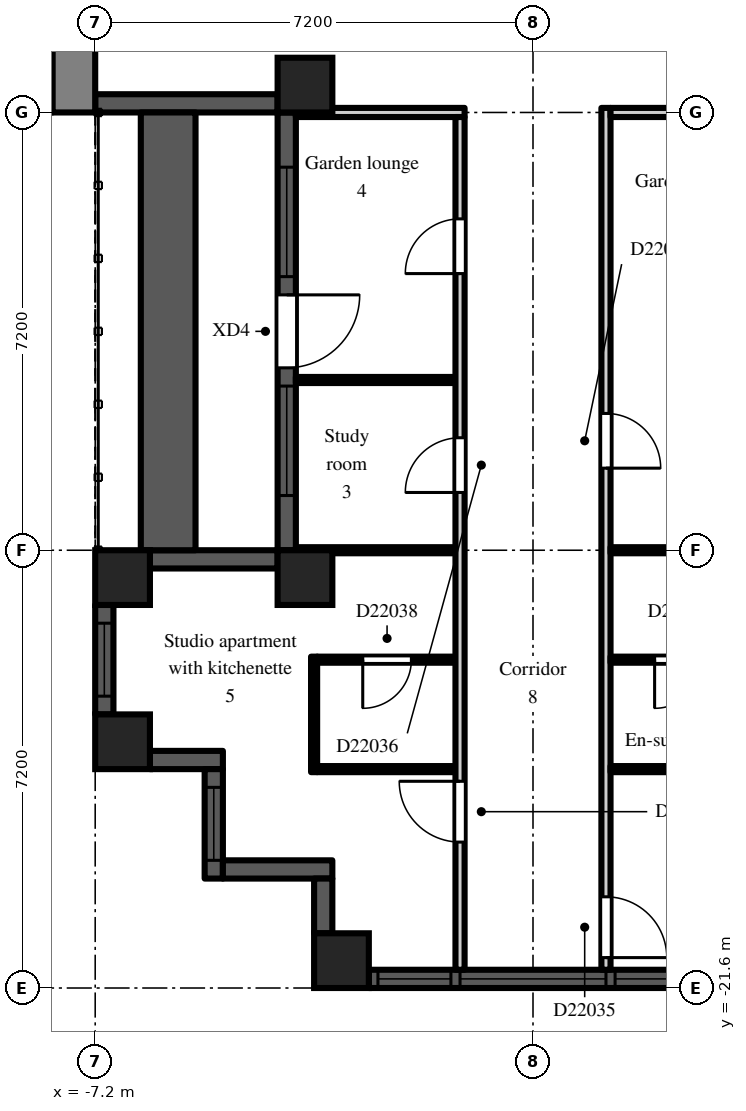
"""IFC4 building model, lengths in metres.
Left out: names, types, materials, properties, quantities, classifications, styles, units other than length and angle.
Written with IfcOpenShell. Run it as: python <this file> out.ifc"""

import sys

from ifc_helpers import new_model, si_unit, direction, frame, frame_2d, origin, origin_2d, place, context, subcontext, project, spatial, rectangle, extrude, element, fill, save


model = new_model("IFC4")
c1 = context("Model", 3, precision=1e-05, world=origin(), true_north=direction((0.0, 1.0)))
c2 = subcontext(c1, "Body", "Model", "MODEL_VIEW")
j1 = project(units=[si_unit("LENGTHUNIT", "METRE"), si_unit("PLANEANGLEUNIT", "RADIAN")], contexts=[c1])
p1 = place(None, origin())
s1 = spatial("IfcSite", under=j1, at=p1, CompositionType="ELEMENT")
p2 = place(p1, origin())
s2 = spatial("IfcBuilding", under=s1, at=p2, CompositionType="ELEMENT")
p3 = place(p2, frame((0.0, 0.0, 159.3)))
s3 = spatial("IfcBuildingStorey", under=s2, at=p3, CompositionType="ELEMENT", Elevation=159.3)
for number, where, z_axis, x_axis in (
    (1, (-6.75, -17.55, 0.0), (0.0, 0.0, 1.0), (1.0, 0.0, 0.0)),
    (2, (-6.75, -14.85, 0.0), (0.0, 0.0, 1.0), (1.0, 0.0, 0.0)),
    (3, (-3.75, -14.85, 0.0), (0.0, 0.0, 1.0), (1.0, 0.0, 0.0)),
    (4, (-3.75, -6.75, 0.0), (0.0, 0.0, 1.0), (1.0, 0.0, 0.0)),
    (5, (-3.15, -21.15, 0.0), (0.0, 0.0, 1.0), (1.0, 0.0, 0.0)),
):
    element("IfcColumn", number, at=place(p3, frame(where, z_axis=z_axis, x_axis=x_axis)), inside=s3, PredefinedType="COLUMN", context=c2, shape_type="SweptSolid", body=[
        extrude(rectangle(XDim=0.9, YDim=0.9, at=origin_2d()), origin(), (0.0, 0.0, 1.0), 3.0),
    ])
p4 = place(p3, frame((-7.2, -7.05, 0.0), z_axis=(0.0, 0.0, 1.0), x_axis=(1.0, 0.0, 0.0)))
e6 = element("IfcWall", 6, at=p4, inside=s3, PredefinedType="SOLIDWALL", context=c2, shape_type="SweptSolid", body=[
    extrude(rectangle(XDim=3.0, YDim=0.3, at=frame_2d((1.5, 0.0))), origin(), (0.0, 0.0, 1.0), 2.55),
])
p5 = place(p3, frame((-4.05, -7.2, 0.0), z_axis=(0.0, 0.0, 1.0), x_axis=(0.0, -1.0, 0.0)))
e7 = element("IfcWall", 7, at=p5, inside=s3, PredefinedType="SOLIDWALL", context=c2, shape_type="SweptSolid", body=[
    extrude(rectangle(XDim=7.2, YDim=0.3, at=frame_2d((3.6, 0.0))), origin(), (0.0, 0.0, 1.0), 2.55),
])
p6 = place(p5, frame((3.0, 0.0, 0.0)))
e8 = element("IfcOpeningElement", 8, at=p6, cuts=e7, PredefinedType="OPENING", context=c2, shape_type="SweptSolid", body=[
    extrude(rectangle(XDim=1.2, YDim=2.05, at=frame_2d((0.6, 1.025))), frame((0.0, 0.16, 0.0), z_axis=(0.0, -1.0, 0.0), x_axis=(1.0, 0.0, 0.0)), (0.0, 0.0, 1.0), 0.32),
])
p7 = place(p5, frame((0.9, 0.0, 0.2)))
e9 = element("IfcOpeningElement", 9, at=p7, cuts=e7, PredefinedType="OPENING", context=c2, shape_type="SweptSolid", body=[
    extrude(rectangle(XDim=1.8, YDim=1.85, at=frame_2d((0.9, 0.925))), frame((0.0, 0.16, 0.0), z_axis=(0.0, -1.0, 0.0), x_axis=(1.0, 0.0, 0.0)), (0.0, 0.0, 1.0), 0.32),
])
p8 = place(p5, frame((4.5, 0.0, 0.2)))
e10 = element("IfcOpeningElement", 10, at=p8, cuts=e7, PredefinedType="OPENING", context=c2, shape_type="SweptSolid", body=[
    extrude(rectangle(XDim=1.8, YDim=1.85, at=frame_2d((0.9, 0.925))), frame((0.0, 0.16, 0.0), z_axis=(0.0, -1.0, 0.0), x_axis=(1.0, 0.0, 0.0)), (0.0, 0.0, 1.0), 0.32),
])
p9 = place(p3, frame((-4.2, -14.55, 0.0), z_axis=(0.0, 0.0, 1.0), x_axis=(-1.0, 0.0, 0.0)))
e11 = element("IfcWall", 11, at=p9, inside=s3, PredefinedType="SOLIDWALL", context=c2, shape_type="SweptSolid", body=[
    extrude(rectangle(XDim=2.1, YDim=0.3, at=frame_2d((1.05, 0.0))), origin(), (0.0, 0.0, 1.0), 2.55),
])
p10 = place(p3, frame((-7.05, -15.3, 0.0), z_axis=(0.0, 0.0, 1.0), x_axis=(0.0, -1.0, 0.0)))
e12 = element("IfcWall", 12, at=p10, inside=s3, PredefinedType="SOLIDWALL", context=c2, shape_type="SweptSolid", body=[
    extrude(rectangle(XDim=1.8, YDim=0.3, at=frame_2d((0.9, 0.0))), origin(), (0.0, 0.0, 1.0), 2.2),
])
p11 = place(p10, frame((0.3, 0.0, 0.2)))
e13 = element("IfcOpeningElement", 13, at=p11, cuts=e12, PredefinedType="OPENING", context=c2, shape_type="SweptSolid", body=[
    extrude(rectangle(XDim=1.2, YDim=1.85, at=frame_2d((0.6, 0.925))), frame((0.0, 0.16, 0.0), z_axis=(0.0, -1.0, 0.0), x_axis=(1.0, 0.0, 0.0)), (0.0, 0.0, 1.0), 0.32),
])
p12 = place(p3, frame((-6.3, -17.85, 0.0), z_axis=(0.0, 0.0, 1.0), x_axis=(1.0, 0.0, 0.0)))
e14 = element("IfcWall", 14, at=p12, inside=s3, PredefinedType="SOLIDWALL", context=c2, shape_type="SweptSolid", body=[
    extrude(rectangle(XDim=1.2, YDim=0.3, at=frame_2d((0.6, 0.0))), origin(), (0.0, 0.0, 1.0), 2.55),
])
p13 = place(p3, frame((-5.25, -18.0, 0.0), z_axis=(0.0, 0.0, 1.0), x_axis=(0.0, -1.0, 0.0)))
e15 = element("IfcWall", 15, at=p13, inside=s3, PredefinedType="SOLIDWALL", context=c2, shape_type="SweptSolid", body=[
    extrude(rectangle(XDim=1.8, YDim=0.3, at=frame_2d((0.9, 0.0))), origin(), (0.0, 0.0, 1.0), 2.55),
])
p14 = place(p13, frame((0.3, 0.0, 0.2)))
e16 = element("IfcOpeningElement", 16, at=p14, cuts=e15, PredefinedType="OPENING", context=c2, shape_type="SweptSolid", body=[
    extrude(rectangle(XDim=1.2, YDim=1.85, at=frame_2d((0.6, 0.925))), frame((0.0, 0.16, 0.0), z_axis=(0.0, -1.0, 0.0), x_axis=(1.0, 0.0, 0.0)), (0.0, 0.0, 1.0), 0.32),
])
p15 = place(p3, frame((-5.1, -19.65, 0.0), z_axis=(0.0, 0.0, 1.0), x_axis=(1.0, 0.0, 0.0)))
e17 = element("IfcWall", 17, at=p15, inside=s3, PredefinedType="SOLIDWALL", context=c2, shape_type="SweptSolid", body=[
    extrude(rectangle(XDim=1.8, YDim=0.3, at=frame_2d((0.9, 0.0))), origin(), (0.0, 0.0, 1.0), 2.55),
])
p16 = place(p3, frame((-3.45, -19.8, 0.0), z_axis=(0.0, 0.0, 1.0), x_axis=(0.0, -1.0, 0.0)))
e18 = element("IfcWall", 18, at=p16, inside=s3, PredefinedType="SOLIDWALL", context=c2, shape_type="SweptSolid", body=[
    extrude(rectangle(XDim=0.9, YDim=0.3, at=frame_2d((0.45, 0.0))), origin(), (0.0, 0.0, 1.0), 2.55),
])
p17 = place(p3, frame((-2.7, -21.45, 0.0), z_axis=(0.0, 0.0, 1.0), x_axis=(1.0, 0.0, 0.0)))
e19 = element("IfcWall", 19, at=p17, inside=s3, PredefinedType="SOLIDWALL", context=c2, shape_type="SweptSolid", body=[
    extrude(rectangle(XDim=5.4, YDim=0.3, at=frame_2d((2.7, 0.0))), origin(), (0.0, 0.0, 1.0), 2.2),
])
p18 = place(p17, frame((1.5, 0.0, 0.2)))
e20 = element("IfcOpeningElement", 20, at=p18, cuts=e19, PredefinedType="OPENING", context=c2, shape_type="SweptSolid", body=[
    extrude(rectangle(XDim=2.4, YDim=1.85, at=frame_2d((1.2, 0.925))), frame((0.0, 0.16, 0.0), z_axis=(0.0, -1.0, 0.0), x_axis=(1.0, 0.0, 0.0)), (0.0, 0.0, 1.0), 0.32),
])
p19 = place(p17, frame((0.15, 0.0, 0.2)))
e21 = element("IfcOpeningElement", 21, at=p19, cuts=e19, PredefinedType="OPENING", context=c2, shape_type="SweptSolid", body=[
    extrude(rectangle(XDim=1.2, YDim=1.85, at=frame_2d((0.6, 0.925))), frame((0.0, 0.16, 0.0), z_axis=(0.0, -1.0, 0.0), x_axis=(1.0, 0.0, 0.0)), (0.0, 0.0, 1.0), 0.32),
])
p20 = place(p17, frame((4.05, 0.0, 0.2)))
e22 = element("IfcOpeningElement", 22, at=p20, cuts=e19, PredefinedType="OPENING", context=c2, shape_type="SweptSolid", body=[
    extrude(rectangle(XDim=1.2, YDim=1.85, at=frame_2d((0.6, 0.925))), frame((0.0, 0.16, 0.0), z_axis=(0.0, -1.0, 0.0), x_axis=(1.0, 0.0, 0.0)), (0.0, 0.0, 1.0), 0.32),
])
p21 = place(p3, frame((-6.0, -14.4, 0.0), z_axis=(0.0, 0.0, 1.0), x_axis=(0.0, 1.0, 0.0)))
e23 = element("IfcWall", 23, at=p21, inside=s3, PredefinedType="PARAPET", context=c2, shape_type="SweptSolid", body=[
    extrude(rectangle(XDim=7.2, YDim=0.9, at=frame_2d((3.6, 0.0))), origin(), (0.0, 0.0, 1.0), 0.8),
])
p22 = place(p3, frame((-7.55, -7.2, 0.0), z_axis=(0.0, 0.0, 1.0), x_axis=(0.0, 1.0, 0.0)))
e24 = element("IfcWall", 24, at=p22, inside=s3, PredefinedType="SHEAR", context=c2, shape_type="SweptSolid", body=[
    extrude(rectangle(XDim=14.4, YDim=0.7, at=frame_2d((7.2, 0.0))), origin(), (0.0, 0.0, 1.0), 2.55),
])
p23 = place(p22, frame((6.0, 0.0, 0.0)))
e25 = element("IfcOpeningElement", 25, at=p23, cuts=e24, PredefinedType="OPENING", context=c2, shape_type="SweptSolid", body=[
    extrude(rectangle(XDim=2.4, YDim=2.2, at=frame_2d((1.2, 1.1))), frame((0.0, 0.36, 0.0), z_axis=(0.0, -1.0, 0.0), x_axis=(1.0, 0.0, 0.0)), (0.0, 0.0, 1.0), 0.72),
])
for number, where, z_axis, x_axis in (
    (26, (-3.9, -14.4, 0.0), (0.0, 0.0, 1.0), (1.0, 0.0, 0.0)),
    (27, (-3.9, -11.6, 0.0), (0.0, 0.0, 1.0), (1.0, 0.0, 0.0)),
):
    element("IfcWall", number, at=place(p3, frame(where, z_axis=z_axis, x_axis=x_axis)), inside=s3, PredefinedType="PARTITIONING", context=c2, shape_type="SweptSolid", body=[
        extrude(rectangle(XDim=2.625, YDim=0.1, at=frame_2d((1.312, 0.0))), origin(), (0.0, 0.0, 1.0), 2.55),
    ])
p24 = place(p3, frame((-3.9, -7.2, 0.0), z_axis=(0.0, 0.0, 1.0), x_axis=(1.0, 0.0, 0.0)))
e28 = element("IfcWall", 28, at=p24, inside=s3, PredefinedType="PARTITIONING", context=c2, shape_type="SweptSolid", body=[
    extrude(rectangle(XDim=2.775, YDim=0.15, at=frame_2d((1.387, 0.0))), origin(), (0.0, 0.0, 1.0), 2.55),
])
p25 = place(p3, frame((-3.6, -18.05, 0.0), z_axis=(0.0, 0.0, 1.0), x_axis=(0.0, 1.0, 0.0)))
e29 = element("IfcWall", 29, at=p25, inside=s3, PredefinedType="PARTITIONING", context=c2, shape_type="SweptSolid", body=[
    extrude(rectangle(XDim=1.9, YDim=0.1, at=frame_2d((0.95, 0.0))), origin(), (0.0, 0.0, 1.0), 2.55),
])
p26 = place(p3, frame((-3.55, -18.0, 0.0), z_axis=(0.0, 0.0, 1.0), x_axis=(1.0, 0.0, 0.0)))
e30 = element("IfcWall", 30, at=p26, inside=s3, PredefinedType="PARTITIONING", context=c2, shape_type="SweptSolid", body=[
    extrude(rectangle(XDim=2.275, YDim=0.1, at=frame_2d((1.138, 0.0))), origin(), (0.0, 0.0, 1.0), 2.55),
])
p27 = place(p3, frame((-3.55, -16.2, 0.0), z_axis=(0.0, 0.0, 1.0), x_axis=(1.0, 0.0, 0.0)))
e31 = element("IfcWall", 31, at=p27, inside=s3, PredefinedType="PARTITIONING", context=c2, shape_type="SweptSolid", body=[
    extrude(rectangle(XDim=2.275, YDim=0.1, at=frame_2d((1.138, 0.0))), origin(), (0.0, 0.0, 1.0), 2.55),
])
p28 = place(p27, frame((0.75, 0.0, 0.0)))
e32 = element("IfcOpeningElement", 32, at=p28, cuts=e31, PredefinedType="OPENING", context=c2, shape_type="SweptSolid", body=[
    extrude(rectangle(XDim=0.8, YDim=2.1, at=frame_2d((0.4, 1.05))), frame((0.0, 0.06, 0.0), z_axis=(0.0, -1.0, 0.0), x_axis=(1.0, 0.0, 0.0)), (0.0, 0.0, 1.0), 0.12),
])
p29 = place(p3, frame((-1.2, -21.3, 0.0), z_axis=(0.0, 0.0, 1.0), x_axis=(0.0, 1.0, 0.0)))
e33 = element("IfcWall", 33, at=p29, inside=s3, PredefinedType="PARTITIONING", context=c2, shape_type="SweptSolid", body=[
    extrude(rectangle(XDim=14.025, YDim=0.15, at=frame_2d((7.013, 0.0))), origin(), (0.0, 0.0, 1.0), 2.55),
])
p30 = place(p29, frame((7.85, 0.0, 0.0)))
e34 = element("IfcOpeningElement", 34, at=p30, cuts=e33, PredefinedType="OPENING", context=c2, shape_type="SweptSolid", body=[
    extrude(rectangle(XDim=0.9, YDim=2.1, at=frame_2d((0.45, 1.05))), frame((0.0, 0.085, 0.0), z_axis=(0.0, -1.0, 0.0), x_axis=(1.0, 0.0, 0.0)), (0.0, 0.0, 1.0), 0.17),
])
p31 = place(p29, frame((11.45, 0.0, 0.0)))
e35 = element("IfcOpeningElement", 35, at=p31, cuts=e33, PredefinedType="OPENING", context=c2, shape_type="SweptSolid", body=[
    extrude(rectangle(XDim=0.9, YDim=2.1, at=frame_2d((0.45, 1.05))), frame((0.0, 0.085, 0.0), z_axis=(0.0, -1.0, 0.0), x_axis=(1.0, 0.0, 0.0)), (0.0, 0.0, 1.0), 0.17),
])
p32 = place(p29, frame((2.1, 0.0, 0.0)))
e36 = element("IfcOpeningElement", 36, at=p32, cuts=e33, PredefinedType="OPENING", context=c2, shape_type="SweptSolid", body=[
    extrude(rectangle(XDim=1.0, YDim=2.1, at=frame_2d((0.5, 1.05))), frame((0.0, 0.085, 0.0), z_axis=(0.0, -1.0, 0.0), x_axis=(1.0, 0.0, 0.0)), (0.0, 0.0, 1.0), 0.17),
])
p33 = place(p3, frame((1.2, -21.3, 0.0), z_axis=(0.0, 0.0, 1.0), x_axis=(0.0, 1.0, 0.0)))
e37 = element("IfcWall", 37, at=p33, inside=s3, PredefinedType="PARTITIONING", context=c2, shape_type="SweptSolid", body=[
    extrude(rectangle(XDim=14.175, YDim=0.15, at=frame_2d((7.087, 0.0))), origin(), (0.0, 0.0, 1.0), 2.55),
])
p34 = place(p33, frame((8.25, 0.0, 0.0)))
e38 = element("IfcOpeningElement", 38, at=p34, cuts=e37, PredefinedType="OPENING", context=c2, shape_type="SweptSolid", body=[
    extrude(rectangle(XDim=0.9, YDim=2.1, at=frame_2d((0.45, 1.05))), frame((0.0, 0.085, 0.0), z_axis=(0.0, -1.0, 0.0), x_axis=(1.0, 0.0, 0.0)), (0.0, 0.0, 1.0), 0.17),
])
p35 = place(p33, frame((0.2, 0.0, 0.0)))
e39 = element("IfcOpeningElement", 39, at=p35, cuts=e37, PredefinedType="OPENING", context=c2, shape_type="SweptSolid", body=[
    extrude(rectangle(XDim=1.0, YDim=2.1, at=frame_2d((0.5, 1.05))), frame((0.0, 0.085, 0.0), z_axis=(0.0, -1.0, 0.0), x_axis=(1.0, 0.0, 0.0)), (0.0, 0.0, 1.0), 0.17),
])
p36 = place(p3, frame((1.275, -18.0, 0.0), z_axis=(0.0, 0.0, 1.0), x_axis=(1.0, 0.0, 0.0)))
e40 = element("IfcWall", 40, at=p36, inside=s3, PredefinedType="PARTITIONING", context=c2, shape_type="SweptSolid", body=[
    extrude(rectangle(XDim=2.375, YDim=0.1, at=frame_2d((1.188, 0.0))), origin(), (0.0, 0.0, 1.0), 2.55),
])
p37 = place(p3, frame((1.275, -16.2, 0.0), z_axis=(0.0, 0.0, 1.0), x_axis=(1.0, 0.0, 0.0)))
e41 = element("IfcWall", 41, at=p37, inside=s3, PredefinedType="PARTITIONING", context=c2, shape_type="SweptSolid", body=[
    extrude(rectangle(XDim=2.375, YDim=0.1, at=frame_2d((1.188, 0.0))), origin(), (0.0, 0.0, 1.0), 2.55),
])
p38 = place(p37, frame((0.725, 0.0, 0.0)))
e42 = element("IfcOpeningElement", 42, at=p38, cuts=e41, PredefinedType="OPENING", context=c2, shape_type="SweptSolid", body=[
    extrude(rectangle(XDim=0.8, YDim=2.1, at=frame_2d((0.4, 1.05))), frame((0.0, 0.06, 0.0), z_axis=(0.0, -1.0, 0.0), x_axis=(1.0, 0.0, 0.0)), (0.0, 0.0, 1.0), 0.12),
])
p39 = place(p3, frame((1.275, -14.4, 0.0), z_axis=(0.0, 0.0, 1.0), x_axis=(1.0, 0.0, 0.0)))
e43 = element("IfcWall", 43, at=p39, inside=s3, PredefinedType="PARTITIONING", context=c2, shape_type="SweptSolid", body=[
    extrude(rectangle(XDim=2.625, YDim=0.1, at=frame_2d((1.312, 0.0))), origin(), (0.0, 0.0, 1.0), 2.55),
])
p40 = place(p3, frame((1.275, -7.2, 0.0), z_axis=(0.0, 0.0, 1.0), x_axis=(1.0, 0.0, 0.0)))
e44 = element("IfcWall", 44, at=p40, inside=s3, PredefinedType="PARTITIONING", context=c2, shape_type="SweptSolid", body=[
    extrude(rectangle(XDim=2.625, YDim=0.15, at=frame_2d((1.312, 0.0))), origin(), (0.0, 0.0, 1.0), 2.55),
])
p41 = place(p6, origin())
e45 = element("IfcDoor", 45, at=p41, inside=s3, OperationType="SINGLE_SWING_LEFT", PredefinedType="DOOR", context=c2, shape_type="SweptSolid", body=[
    extrude(rectangle(XDim=1.2, YDim=2.05, at=frame_2d((0.6, 1.025))), frame((0.0, 0.025, 0.0), z_axis=(0.0, -1.0, 0.0), x_axis=(1.0, 0.0, 0.0)), (0.0, 0.0, 1.0), 0.05),
])
fill(e8, e45)
p42 = place(p7, origin())
e46 = element("IfcWindow", 46, at=p42, inside=s3, PartitioningType="SINGLE_PANEL", PredefinedType="WINDOW", context=c2, shape_type="SweptSolid", body=[
    extrude(rectangle(XDim=1.8, YDim=1.85, at=frame_2d((0.9, 0.925))), frame((0.0, 0.03, 0.0), z_axis=(0.0, -1.0, 0.0), x_axis=(1.0, 0.0, 0.0)), (0.0, 0.0, 1.0), 0.06),
])
fill(e9, e46)
p43 = place(p8, origin())
e47 = element("IfcWindow", 47, at=p43, inside=s3, PartitioningType="SINGLE_PANEL", PredefinedType="WINDOW", context=c2, shape_type="SweptSolid", body=[
    extrude(rectangle(XDim=1.8, YDim=1.85, at=frame_2d((0.9, 0.925))), frame((0.0, 0.03, 0.0), z_axis=(0.0, -1.0, 0.0), x_axis=(1.0, 0.0, 0.0)), (0.0, 0.0, 1.0), 0.06),
])
fill(e10, e47)
p44 = place(p11, origin())
e48 = element("IfcWindow", 48, at=p44, inside=s3, PartitioningType="SINGLE_PANEL", PredefinedType="WINDOW", context=c2, shape_type="SweptSolid", body=[
    extrude(rectangle(XDim=1.2, YDim=1.85, at=frame_2d((0.6, 0.925))), frame((0.0, 0.03, 0.0), z_axis=(0.0, -1.0, 0.0), x_axis=(1.0, 0.0, 0.0)), (0.0, 0.0, 1.0), 0.06),
])
fill(e13, e48)
p45 = place(p14, origin())
e49 = element("IfcWindow", 49, at=p45, inside=s3, PartitioningType="SINGLE_PANEL", PredefinedType="WINDOW", context=c2, shape_type="SweptSolid", body=[
    extrude(rectangle(XDim=1.2, YDim=1.85, at=frame_2d((0.6, 0.925))), frame((0.0, 0.03, 0.0), z_axis=(0.0, -1.0, 0.0), x_axis=(1.0, 0.0, 0.0)), (0.0, 0.0, 1.0), 0.06),
])
fill(e16, e49)
p46 = place(p18, origin())
e50 = element("IfcWindow", 50, at=p46, inside=s3, PartitioningType="SINGLE_PANEL", PredefinedType="WINDOW", context=c2, shape_type="SweptSolid", body=[
    extrude(rectangle(XDim=2.4, YDim=1.85, at=frame_2d((1.2, 0.925))), frame((0.0, 0.03, 0.0), z_axis=(0.0, -1.0, 0.0), x_axis=(1.0, 0.0, 0.0)), (0.0, 0.0, 1.0), 0.06),
])
fill(e20, e50)
p47 = place(p19, origin())
e51 = element("IfcWindow", 51, at=p47, inside=s3, PartitioningType="SINGLE_PANEL", PredefinedType="WINDOW", context=c2, shape_type="SweptSolid", body=[
    extrude(rectangle(XDim=1.2, YDim=1.85, at=frame_2d((0.6, 0.925))), frame((0.0, 0.03, 0.0), z_axis=(0.0, -1.0, 0.0), x_axis=(1.0, 0.0, 0.0)), (0.0, 0.0, 1.0), 0.06),
])
fill(e21, e51)
p48 = place(p20, origin())
e52 = element("IfcWindow", 52, at=p48, inside=s3, PartitioningType="SINGLE_PANEL", PredefinedType="WINDOW", context=c2, shape_type="SweptSolid", body=[
    extrude(rectangle(XDim=1.2, YDim=1.85, at=frame_2d((0.6, 0.925))), frame((0.0, 0.03, 0.0), z_axis=(0.0, -1.0, 0.0), x_axis=(1.0, 0.0, 0.0)), (0.0, 0.0, 1.0), 0.06),
])
fill(e22, e52)
p49 = place(p34, frame((0.9, 0.0, 0.0), z_axis=(0.0, 0.0, 1.0), x_axis=(-1.0, 0.0, 0.0)))
e53 = element("IfcDoor", 53, at=p49, inside=s3, OperationType="SINGLE_SWING_RIGHT", PredefinedType="DOOR", context=c2, shape_type="SweptSolid", body=[
    extrude(rectangle(XDim=0.9, YDim=2.1, at=frame_2d((0.45, 1.05))), frame((0.0, 0.025, 0.0), z_axis=(0.0, -1.0, 0.0), x_axis=(1.0, 0.0, 0.0)), (0.0, 0.0, 1.0), 0.05),
])
fill(e38, e53)
p50 = place(p38, frame((0.8, 0.0, 0.0), z_axis=(0.0, 0.0, 1.0), x_axis=(-1.0, 0.0, 0.0)))
e54 = element("IfcDoor", 54, at=p50, inside=s3, OperationType="SINGLE_SWING_RIGHT", PredefinedType="DOOR", context=c2, shape_type="SweptSolid", body=[
    extrude(rectangle(XDim=0.8, YDim=2.1, at=frame_2d((0.4, 1.05))), frame((0.0, 0.025, 0.0), z_axis=(0.0, -1.0, 0.0), x_axis=(1.0, 0.0, 0.0)), (0.0, 0.0, 1.0), 0.05),
])
fill(e42, e54)
p51 = place(p35, frame((1.0, 0.0, 0.0), z_axis=(0.0, 0.0, 1.0), x_axis=(-1.0, 0.0, 0.0)))
e55 = element("IfcDoor", 55, at=p51, inside=s3, OperationType="SINGLE_SWING_RIGHT", PredefinedType="DOOR", context=c2, shape_type="SweptSolid", body=[
    extrude(rectangle(XDim=1.0, YDim=2.1, at=frame_2d((0.5, 1.05))), frame((0.0, 0.025, 0.0), z_axis=(0.0, -1.0, 0.0), x_axis=(1.0, 0.0, 0.0)), (0.0, 0.0, 1.0), 0.05),
])
fill(e39, e55)
p52 = place(p30, origin())
e56 = element("IfcDoor", 56, at=p52, inside=s3, OperationType="SINGLE_SWING_LEFT", PredefinedType="DOOR", context=c2, shape_type="SweptSolid", body=[
    extrude(rectangle(XDim=0.9, YDim=2.1, at=frame_2d((0.45, 1.05))), frame((0.0, 0.025, 0.0), z_axis=(0.0, -1.0, 0.0), x_axis=(1.0, 0.0, 0.0)), (0.0, 0.0, 1.0), 0.05),
])
fill(e34, e56)
p53 = place(p31, origin())
e57 = element("IfcDoor", 57, at=p53, inside=s3, OperationType="SINGLE_SWING_LEFT", PredefinedType="DOOR", context=c2, shape_type="SweptSolid", body=[
    extrude(rectangle(XDim=0.9, YDim=2.1, at=frame_2d((0.45, 1.05))), frame((0.0, 0.025, 0.0), z_axis=(0.0, -1.0, 0.0), x_axis=(1.0, 0.0, 0.0)), (0.0, 0.0, 1.0), 0.05),
])
fill(e35, e57)
p54 = place(p28, frame((0.8, 0.0, 0.0), z_axis=(0.0, 0.0, 1.0), x_axis=(-1.0, 0.0, 0.0)))
e58 = element("IfcDoor", 58, at=p54, inside=s3, OperationType="SINGLE_SWING_RIGHT", PredefinedType="DOOR", context=c2, shape_type="SweptSolid", body=[
    extrude(rectangle(XDim=0.8, YDim=2.1, at=frame_2d((0.4, 1.05))), frame((0.0, 0.025, 0.0), z_axis=(0.0, -1.0, 0.0), x_axis=(1.0, 0.0, 0.0)), (0.0, 0.0, 1.0), 0.05),
])
fill(e32, e58)
p55 = place(p32, origin())
e59 = element("IfcDoor", 59, at=p55, inside=s3, OperationType="SINGLE_SWING_RIGHT", PredefinedType="DOOR", context=c2, shape_type="SweptSolid", body=[
    extrude(rectangle(XDim=1.0, YDim=2.1, at=frame_2d((0.5, 1.05))), frame((0.0, 0.025, 0.0), z_axis=(0.0, -1.0, 0.0), x_axis=(1.0, 0.0, 0.0)), (0.0, 0.0, 1.0), 0.05),
])
fill(e36, e59)
save(model, sys.argv[1])
